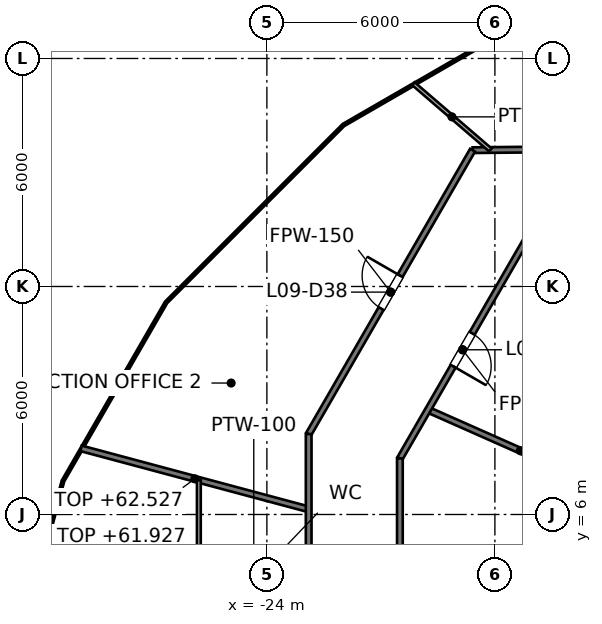
"""IFC4 building model, lengths in metres.
Left out: names, types, materials, properties, quantities, classifications, styles, units other than length and angle.
Written with IfcOpenShell. Run it as: python <this file> out.ifc"""

import sys

from ifc_helpers import new_model, si_unit, direction, frame, frame_2d, origin, place, context, subcontext, project, spatial, rectangle, extrude, element, fill, save


model = new_model("IFC4")
c1 = context("Model", 3, precision=1e-05, world=origin(), true_north=direction((0.0, 1.0)))
c2 = subcontext(c1, "Body", "Model", "MODEL_VIEW")
j1 = project(units=[si_unit("LENGTHUNIT", "METRE"), si_unit("PLANEANGLEUNIT", "RADIAN")], contexts=[c1])
p1 = place(None, origin())
s1 = spatial("IfcSite", under=j1, at=p1, CompositionType="ELEMENT")
p2 = place(p1, origin())
s2 = spatial("IfcBuilding", under=s1, at=p2, CompositionType="ELEMENT")
p3 = place(p2, frame((0.0, 0.0, 58.8)))
s3 = spatial("IfcBuildingStorey", under=s2, at=p3, CompositionType="ELEMENT", Elevation=58.8)
p4 = place(p3, frame((-19.76, 8.755, 0.0), z_axis=(0.0, 0.0, 1.0), x_axis=(0.91424834547, -0.405154245695, 0.0)))
e1 = element("IfcWall", 1, at=p4, inside=s3, PredefinedType="PARTITIONING", context=c2, shape_type="SweptSolid", body=[
    extrude(rectangle(XDim=5.318, YDim=0.15, at=frame_2d((2.659, 0.0))), origin(), (0.0, 0.0, 1.0), 3.276),
])
p5 = place(p3, frame((-28.891, 7.741, 0.0), z_axis=(0.0, 0.0, 1.0), x_axis=(0.965940321577, -0.258764941893, 0.0)))
e2 = element("IfcWall", 2, at=p5, inside=s3, PredefinedType="PARTITIONING", context=c2, shape_type="SweptSolid", body=[
    extrude(rectangle(XDim=6.202, YDim=0.15, at=frame_2d((3.101, 0.0))), origin(), (0.0, 0.0, 1.0), 3.727),
])
p6 = place(p3, frame((-18.587, 15.587, 0.0), z_axis=(0.0, 0.0, 1.0), x_axis=(0.99995065417, 0.009934245078, 0.0)))
e3 = element("IfcWall", 3, at=p6, inside=s3, PredefinedType="PARTITIONING", context=c2, shape_type="SweptSolid", body=[
    extrude(rectangle(XDim=33.669, YDim=0.15, at=frame_2d((16.834, 0.0))), origin(), (0.0, 0.0, 1.0), 3.127),
])
p7 = place(p6, frame((18.716, 0.0, 0.0)))
e4 = element("IfcOpeningElement", 4, at=p7, cuts=e3, PredefinedType="OPENING", context=c2, shape_type="SweptSolid", body=[
    extrude(rectangle(XDim=1.0, YDim=2.1, at=frame_2d((0.5, 1.05))), frame((0.0, 0.075, 0.0), z_axis=(0.0, -1.0, 0.0), x_axis=(1.0, 0.0, 0.0)), (0.0, 0.0, 1.0), 0.15),
])
p8 = place(p6, frame((8.228, 0.0, 0.0)))
e5 = element("IfcOpeningElement", 5, at=p8, cuts=e3, PredefinedType="OPENING", context=c2, shape_type="SweptSolid", body=[
    extrude(rectangle(XDim=1.0, YDim=2.1, at=frame_2d((0.5, 1.05))), frame((0.0, 0.075, 0.0), z_axis=(0.0, -1.0, 0.0), x_axis=(1.0, 0.0, 0.0)), (0.0, 0.0, 1.0), 0.15),
])
p9 = place(p6, frame((29.768, 0.0, 0.0)))
e6 = element("IfcOpeningElement", 6, at=p9, cuts=e3, PredefinedType="OPENING", context=c2, shape_type="SweptSolid", body=[
    extrude(rectangle(XDim=1.0, YDim=2.1, at=frame_2d((0.5, 1.05))), frame((0.0, 0.075, 0.0), z_axis=(0.0, -1.0, 0.0), x_axis=(1.0, 0.0, 0.0)), (0.0, 0.0, 1.0), 0.15),
])
p10 = place(p6, frame((24.449, 0.0, 0.0)))
e7 = element("IfcOpeningElement", 7, at=p10, cuts=e3, PredefinedType="OPENING", context=c2, shape_type="SweptSolid", body=[
    extrude(rectangle(XDim=1.0, YDim=2.1, at=frame_2d((0.5, 1.05))), frame((0.0, 0.075, 0.0), z_axis=(0.0, -1.0, 0.0), x_axis=(1.0, 0.0, 0.0)), (0.0, 0.0, 1.0), 0.15),
])
p11 = place(p3, frame((-20.5, 7.474, 0.0), z_axis=(0.0, 0.0, 1.0), x_axis=(0.500012665616, 0.866018091164, 0.0)))
e8 = element("IfcWall", 8, at=p11, inside=s3, PredefinedType="PARTITIONING", context=c2, shape_type="SweptSolid", body=[
    extrude(rectangle(XDim=6.602, YDim=0.15, at=frame_2d((3.301, 0.0))), origin(), (0.0, 0.0, 1.0), 3.195),
])
p12 = place(p11, frame((2.803, 0.0, 0.0)))
e9 = element("IfcOpeningElement", 9, at=p12, cuts=e8, PredefinedType="OPENING", context=c2, shape_type="SweptSolid", body=[
    extrude(rectangle(XDim=1.0, YDim=2.1, at=frame_2d((0.5, 1.05))), frame((0.0, 0.075, 0.0), z_axis=(0.0, -1.0, 0.0), x_axis=(1.0, 0.0, 0.0)), (0.0, 0.0, 1.0), 0.15),
])
p13 = place(p3, frame((-22.9, 8.117, 0.0), z_axis=(0.0, 0.0, 1.0), x_axis=(0.500017275495, 0.866015429543, 0.0)))
e10 = element("IfcWall", 10, at=p13, inside=s3, PredefinedType="PARTITIONING", context=c2, shape_type="SweptSolid", body=[
    extrude(rectangle(XDim=8.626, YDim=0.15, at=frame_2d((4.313, 0.0))), origin(), (0.0, 0.0, 1.0), 3.195),
])
p14 = place(p13, frame((3.813, 0.0, 0.0)))
e11 = element("IfcOpeningElement", 11, at=p14, cuts=e10, PredefinedType="OPENING", context=c2, shape_type="SweptSolid", body=[
    extrude(rectangle(XDim=1.0, YDim=2.1, at=frame_2d((0.5, 1.05))), frame((0.0, 0.075, 0.0), z_axis=(0.0, -1.0, 0.0), x_axis=(1.0, 0.0, 0.0)), (0.0, 0.0, 1.0), 0.15),
])
p15 = place(p3, frame((-20.5, -7.095, 0.0), z_axis=(0.0, 0.0, 1.0), x_axis=(0.0, 1.0, 0.0)))
e12 = element("IfcWall", 12, at=p15, inside=s3, PredefinedType="PARTITIONING", context=c2, shape_type="SweptSolid", body=[
    extrude(rectangle(XDim=14.569, YDim=0.15, at=frame_2d((7.285, 0.0))), origin(), (0.0, 0.0, 1.0), 3.127),
])
p16 = place(p15, frame((10.234, 0.0, 0.0)))
e13 = element("IfcOpeningElement", 13, at=p16, cuts=e12, PredefinedType="OPENING", context=c2, shape_type="SweptSolid", body=[
    extrude(rectangle(XDim=1.0, YDim=2.1, at=frame_2d((0.5, 1.05))), frame((0.0, 0.075, 0.0), z_axis=(0.0, -1.0, 0.0), x_axis=(1.0, 0.0, 0.0)), (0.0, 0.0, 1.0), 0.15),
])
p17 = place(p15, frame((3.0, 0.0, 0.0)))
e14 = element("IfcOpeningElement", 14, at=p17, cuts=e12, PredefinedType="OPENING", context=c2, shape_type="SweptSolid", body=[
    extrude(rectangle(XDim=1.0, YDim=2.1, at=frame_2d((0.5, 1.05))), frame((0.0, 0.075, 0.0), z_axis=(0.0, -1.0, 0.0), x_axis=(1.0, 0.0, 0.0)), (0.0, 0.0, 1.0), 0.15),
])
p18 = place(p3, frame((-22.9, -7.572, 0.0), z_axis=(0.0, 0.0, 1.0), x_axis=(0.0, 1.0, 0.0)))
e15 = element("IfcWall", 15, at=p18, inside=s3, PredefinedType="PARTITIONING", context=c2, shape_type="SweptSolid", body=[
    extrude(rectangle(XDim=15.689, YDim=0.15, at=frame_2d((7.844, 0.0))), origin(), (0.0, 0.0, 1.0), 3.127),
])
p19 = place(p18, frame((11.583, 0.0, 0.0)))
e16 = element("IfcOpeningElement", 16, at=p19, cuts=e15, PredefinedType="OPENING", context=c2, shape_type="SweptSolid", body=[
    extrude(rectangle(XDim=1.0, YDim=2.1, at=frame_2d((0.5, 1.05))), frame((0.0, 0.075, 0.0), z_axis=(0.0, -1.0, 0.0), x_axis=(1.0, 0.0, 0.0)), (0.0, 0.0, 1.0), 0.15),
])
p20 = place(p18, frame((4.832, 0.0, 0.0)))
e17 = element("IfcOpeningElement", 17, at=p20, cuts=e15, PredefinedType="OPENING", context=c2, shape_type="SweptSolid", body=[
    extrude(rectangle(XDim=1.0, YDim=2.1, at=frame_2d((0.5, 1.05))), frame((0.0, 0.075, 0.0), z_axis=(0.0, -1.0, 0.0), x_axis=(1.0, 0.0, 0.0)), (0.0, 0.0, 1.0), 0.15),
])
p21 = place(p3, frame((-20.143, 17.335, 0.0), z_axis=(0.0, 0.0, 1.0), x_axis=(0.757945732802, -0.652317611389, 0.0)))
e18 = element("IfcWall", 18, at=p21, inside=s3, PredefinedType="PARTITIONING", context=c2, shape_type="SweptSolid", body=[
    extrude(rectangle(XDim=2.672, YDim=0.1, at=frame_2d((1.336, 0.0))), origin(), (0.0, 0.0, 1.0), 3.573),
])
p22 = place(p3, frame((-25.79, -8.147, 0.0), z_axis=(0.0, 0.0, 1.0), x_axis=(0.0, 1.0, 0.0)))
e19 = element("IfcWall", 19, at=p22, inside=s3, PredefinedType="PARTITIONING", context=c2, shape_type="SweptSolid", body=[
    extrude(rectangle(XDim=15.057, YDim=0.1, at=frame_2d((7.528, 0.0))), origin(), (0.0, 0.0, 1.0), 3.127),
])
p23 = place(p22, frame((5.308, 0.0, 0.0)))
e20 = element("IfcOpeningElement", 20, at=p23, cuts=e19, PredefinedType="OPENING", context=c2, shape_type="SweptSolid", body=[
    extrude(rectangle(XDim=0.9, YDim=2.1, at=frame_2d((0.45, 1.05))), frame((0.0, 0.05, 0.0), z_axis=(0.0, -1.0, 0.0), x_axis=(1.0, 0.0, 0.0)), (0.0, 0.0, 1.0), 0.1),
])
p24 = place(p12, origin())
e21 = element("IfcDoor", 21, at=p24, inside=s3, OperationType="SINGLE_SWING_LEFT", PredefinedType="DOOR", context=c2, shape_type="SweptSolid", body=[
    extrude(rectangle(XDim=1.0, YDim=2.1, at=frame_2d((0.5, 1.05))), frame((0.0, 0.025, 0.0), z_axis=(0.0, -1.0, 0.0), x_axis=(1.0, 0.0, 0.0)), (0.0, 0.0, 1.0), 0.05),
])
fill(e9, e21)
p25 = place(p14, origin())
e22 = element("IfcDoor", 22, at=p25, inside=s3, OperationType="SINGLE_SWING_RIGHT", PredefinedType="DOOR", context=c2, shape_type="SweptSolid", body=[
    extrude(rectangle(XDim=1.0, YDim=2.1, at=frame_2d((0.5, 1.05))), frame((0.0, 0.025, 0.0), z_axis=(0.0, -1.0, 0.0), x_axis=(1.0, 0.0, 0.0)), (0.0, 0.0, 1.0), 0.05),
])
fill(e11, e22)
save(model, sys.argv[1])
